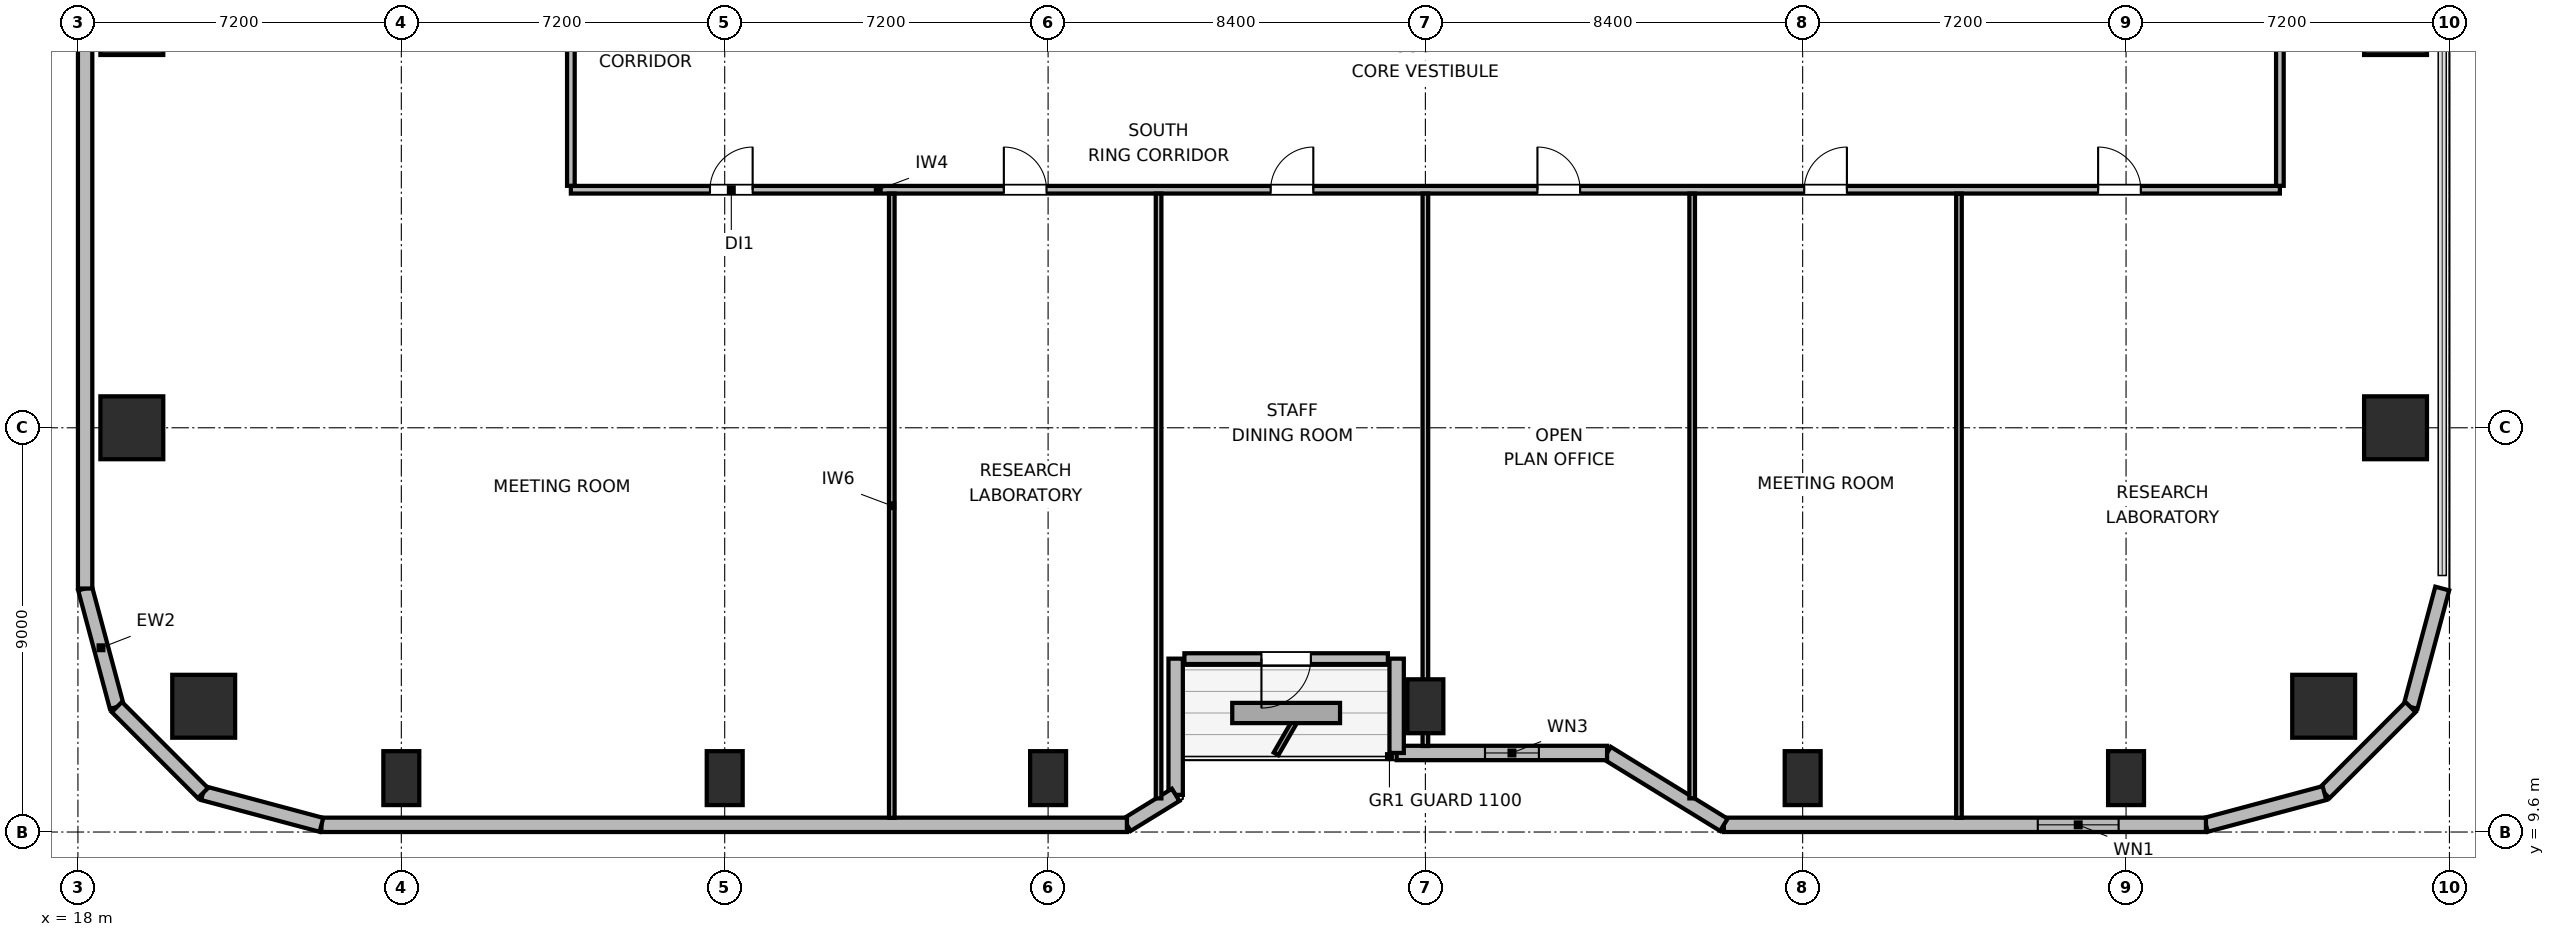
"""IFC4 building model, lengths in metres.
Left out: names, types, materials, properties, quantities, classifications, styles, units other than length and angle.
Written with IfcOpenShell. Run it as: python <this file> out.ifc"""

import sys

from ifc_helpers import new_model, si_unit, direction, frame, frame_2d, origin, origin_2d, place, context, subcontext, project, spatial, rectangle, circle, extrude, element, fill, save


model = new_model("IFC4")
c1 = context("Model", 3, precision=1e-05, world=origin(), true_north=direction((0.0, 1.0)))
c2 = subcontext(c1, "Body", "Model", "MODEL_VIEW")
j1 = project(units=[si_unit("LENGTHUNIT", "METRE"), si_unit("PLANEANGLEUNIT", "RADIAN")], contexts=[c1])
p1 = place(None, origin())
s1 = spatial("IfcSite", under=j1, at=p1, CompositionType="ELEMENT")
p2 = place(p1, origin())
s2 = spatial("IfcBuilding", under=s1, at=p2, CompositionType="ELEMENT")
p3 = place(p2, frame((0.0, 0.0, 105.3)))
s3 = spatial("IfcBuildingStorey", under=s2, at=p3, CompositionType="ELEMENT", Elevation=105.3)
for number, where, z_axis, x_axis in (
    (1, (20.8, 12.4, 0.0), (0.0, 0.0, 1.0), (1.0, 0.0, 0.0)),
    (2, (68.0, 12.4, 0.0), (0.0, 0.0, 1.0), (1.0, 0.0, 0.0)),
):
    element("IfcColumn", number, at=place(p3, frame(where, z_axis=z_axis, x_axis=x_axis)), inside=s3, PredefinedType="COLUMN", context=c2, shape_type="SweptSolid", body=[
        extrude(circle(Radius=0.7, at=origin_2d()), origin(), (0.0, 0.0, 1.0), 3.9),
    ])
for number, where, z_axis, x_axis in (
    (3, (25.2, 10.8, 0.0), (0.0, 0.0, 1.0), (1.0, 0.0, 0.0)),
    (4, (32.4, 10.8, 0.0), (0.0, 0.0, 1.0), (1.0, 0.0, 0.0)),
    (5, (39.6, 10.8, 0.0), (0.0, 0.0, 1.0), (1.0, 0.0, 0.0)),
    (6, (48.0, 12.4, 0.0), (0.0, 0.0, 1.0), (1.0, 0.0, 0.0)),
    (7, (56.4, 10.8, 0.0), (0.0, 0.0, 1.0), (1.0, 0.0, 0.0)),
    (8, (63.6, 10.8, 0.0), (0.0, 0.0, 1.0), (1.0, 0.0, 0.0)),
):
    element("IfcColumn", number, at=place(p3, frame(where, z_axis=z_axis, x_axis=x_axis)), inside=s3, PredefinedType="COLUMN", context=c2, shape_type="SweptSolid", body=[
        extrude(rectangle(XDim=0.8, YDim=1.2, at=origin_2d()), origin(), (0.0, 0.0, 1.0), 3.9),
    ])
for number, where, z_axis, x_axis in (
    (9, (19.2, 18.6, 0.0), (0.0, 0.0, 1.0), (1.0, 0.0, 0.0)),
    (10, (69.6, 18.6, 0.0), (0.0, 0.0, 1.0), (1.0, 0.0, 0.0)),
    (11, (19.2, 27.6, 0.0), (0.0, 0.0, 1.0), (1.0, 0.0, 0.0)),
    (12, (69.6, 27.6, 0.0), (0.0, 0.0, 1.0), (1.0, 0.0, 0.0)),
):
    element("IfcColumn", number, at=place(p3, frame(where, z_axis=z_axis, x_axis=x_axis)), inside=s3, PredefinedType="COLUMN", context=c2, shape_type="SweptSolid", body=[
        extrude(rectangle(XDim=1.4, YDim=1.4, at=origin_2d()), origin(), (0.0, 0.0, 1.0), 3.9),
    ])
p4 = place(p3, frame((18.866, 12.383, 0.0), z_axis=(0.0, 0.0, 1.0), x_axis=(-0.25869736047, 0.965958423373, 0.0)))
e13 = element("IfcWall", 13, at=p4, inside=s3, PredefinedType="SOLIDWALL", context=c2, shape_type="SweptSolid", body=[
    extrude(rectangle(XDim=2.731, YDim=0.32, at=frame_2d((1.366, 0.0))), origin(), (0.0, 0.0, 1.0), 3.64),
])
p5 = place(p3, frame((18.16, 15.021, 0.0), z_axis=(0.0, 0.0, 1.0), x_axis=(0.0, 1.0, 0.0)))
e14 = element("IfcWall", 14, at=p5, inside=s3, PredefinedType="SOLIDWALL", context=c2, shape_type="SweptSolid", body=[
    extrude(rectangle(XDim=14.219, YDim=0.32, at=frame_2d((7.109, 0.0))), origin(), (0.0, 0.0, 1.0), 3.64),
])
p6 = place(p3, frame((70.64, 15.021, 0.0), z_axis=(0.0, 0.0, 1.0), x_axis=(-0.258613949072, -0.965980758269, 0.0)))
e15 = element("IfcWall", 15, at=p6, inside=s3, PredefinedType="SOLIDWALL", context=c2, shape_type="SweptSolid", body=[
    extrude(rectangle(XDim=2.731, YDim=0.32, at=frame_2d((1.366, 0.0))), origin(), (0.0, 0.0, 1.0), 3.64),
])
p7 = place(p3, frame((69.934, 12.383, 0.0), z_axis=(0.0, 0.0, 1.0), x_axis=(-0.707151821269, -0.707061738235, 0.0)))
e16 = element("IfcWall", 16, at=p7, inside=s3, PredefinedType="SOLIDWALL", context=c2, shape_type="SweptSolid", body=[
    extrude(rectangle(XDim=2.71, YDim=0.32, at=frame_2d((1.355, 0.0))), origin(), (0.0, 0.0, 1.0), 3.64),
])
p8 = place(p3, frame((68.017, 10.467, 0.0), z_axis=(0.0, 0.0, 1.0), x_axis=(-0.965958423373, -0.25869736047, 0.0)))
e17 = element("IfcWall", 17, at=p8, inside=s3, PredefinedType="SOLIDWALL", context=c2, shape_type="SweptSolid", body=[
    extrude(rectangle(XDim=2.731, YDim=0.32, at=frame_2d((1.366, 0.0))), origin(), (0.0, 0.0, 1.0), 3.64),
])
p9 = place(p3, frame((65.379, 9.76, 0.0), z_axis=(0.0, 0.0, 1.0), x_axis=(-1.0, 0.0, 0.0)))
e18 = element("IfcWall", 18, at=p9, inside=s3, PredefinedType="SOLIDWALL", context=c2, shape_type="SweptSolid", body=[
    extrude(rectangle(XDim=10.734, YDim=0.32, at=frame_2d((5.367, 0.0))), origin(), (0.0, 0.0, 1.0), 3.64),
])
p10 = place(p9, frame((1.944, 0.0, 0.85)))
e19 = element("IfcOpeningElement", 19, at=p10, cuts=e18, PredefinedType="OPENING", context=c2, shape_type="SweptSolid", body=[
    extrude(rectangle(XDim=1.8, YDim=1.1, at=frame_2d((0.9, 0.55))), frame((0.0, 0.17, 0.0), z_axis=(0.0, -1.0, 0.0), x_axis=(1.0, 0.0, 0.0)), (0.0, 0.0, 1.0), 0.34),
])
p11 = place(p3, frame((54.645, 9.76, 0.0), z_axis=(0.0, 0.0, 1.0), x_axis=(-0.851630857047, 0.524142044989, 0.0)))
e20 = element("IfcWall", 20, at=p11, inside=s3, PredefinedType="SOLIDWALL", context=c2, shape_type="SweptSolid", body=[
    extrude(rectangle(XDim=3.053, YDim=0.32, at=frame_2d((1.526, 0.0))), origin(), (0.0, 0.0, 1.0), 2.875),
])
p12 = place(p3, frame((52.045, 11.36, 0.0), z_axis=(0.0, 0.0, 1.0), x_axis=(-1.0, 0.0, 0.0)))
e21 = element("IfcWall", 21, at=p12, inside=s3, PredefinedType="SOLIDWALL", context=c2, shape_type="SweptSolid", body=[
    extrude(rectangle(XDim=4.685, YDim=0.32, at=frame_2d((2.343, 0.0))), origin(), (0.0, 0.0, 1.0), 2.875),
])
p13 = place(p12, frame((1.518, 0.0, 0.85)))
e22 = element("IfcOpeningElement", 22, at=p13, cuts=e21, PredefinedType="OPENING", context=c2, shape_type="SweptSolid", body=[
    extrude(rectangle(XDim=1.2, YDim=1.1, at=frame_2d((0.6, 0.55))), frame((0.0, 0.17, 0.0), z_axis=(0.0, -1.0, 0.0), x_axis=(1.0, 0.0, 0.0)), (0.0, 0.0, 1.0), 0.34),
])
p14 = place(p3, frame((47.36, 11.36, 0.0), z_axis=(0.0, 0.0, 1.0), x_axis=(0.0, 1.0, 0.0)))
e23 = element("IfcWall", 23, at=p14, inside=s3, PredefinedType="SOLIDWALL", context=c2, shape_type="SweptSolid", body=[
    extrude(rectangle(XDim=2.1, YDim=0.32, at=frame_2d((1.05, 0.0))), origin(), (0.0, 0.0, 1.0), 2.875),
])
p15 = place(p3, frame((47.165, 13.46, 0.0), z_axis=(0.0, 0.0, 1.0), x_axis=(-1.0, 0.0, 0.0)))
e24 = element("IfcWall", 24, at=p15, inside=s3, PredefinedType="SOLIDWALL", context=c2, shape_type="SweptSolid", body=[
    extrude(rectangle(XDim=4.53, YDim=0.24, at=frame_2d((2.265, 0.0))), origin(), (0.0, 0.0, 1.0), 3.64),
])
p16 = place(p15, frame((1.715, 0.0, 0.0)))
e25 = element("IfcOpeningElement", 25, at=p16, cuts=e24, PredefinedType="OPENING", context=c2, shape_type="SweptSolid", body=[
    extrude(rectangle(XDim=1.1, YDim=2.04, at=frame_2d((0.55, 1.02))), frame((0.0, 0.13, 0.0), z_axis=(0.0, -1.0, 0.0), x_axis=(1.0, 0.0, 0.0)), (0.0, 0.0, 1.0), 0.26),
])
p17 = place(p3, frame((42.44, 13.46, 0.0), z_axis=(0.0, 0.0, 1.0), x_axis=(0.0, -1.0, 0.0)))
e26 = element("IfcWall", 26, at=p17, inside=s3, PredefinedType="SOLIDWALL", context=c2, shape_type="SweptSolid", body=[
    extrude(rectangle(XDim=3.032, YDim=0.32, at=frame_2d((1.516, 0.0))), origin(), (0.0, 0.0, 1.0), 2.875),
])
p18 = place(p3, frame((42.44, 10.427, 0.0), z_axis=(0.0, 0.0, 1.0), x_axis=(-0.851776724646, -0.523904964045, 0.0)))
e27 = element("IfcWall", 27, at=p18, inside=s3, PredefinedType="SOLIDWALL", context=c2, shape_type="SweptSolid", body=[
    extrude(rectangle(XDim=1.274, YDim=0.32, at=frame_2d((0.637, 0.0))), origin(), (0.0, 0.0, 1.0), 3.64),
])
p19 = place(p3, frame((41.355, 9.76, 0.0), z_axis=(0.0, 0.0, 1.0), x_axis=(-1.0, 0.0, 0.0)))
e28 = element("IfcWall", 28, at=p19, inside=s3, PredefinedType="SOLIDWALL", context=c2, shape_type="SweptSolid", body=[
    extrude(rectangle(XDim=17.934, YDim=0.32, at=frame_2d((8.967, 0.0))), origin(), (0.0, 0.0, 1.0), 3.64),
])
p20 = place(p3, frame((23.421, 9.76, 0.0), z_axis=(0.0, 0.0, 1.0), x_axis=(-0.965964405026, 0.25867502435, 0.0)))
e29 = element("IfcWall", 29, at=p20, inside=s3, PredefinedType="SOLIDWALL", context=c2, shape_type="SweptSolid", body=[
    extrude(rectangle(XDim=2.731, YDim=0.32, at=frame_2d((1.366, 0.0))), origin(), (0.0, 0.0, 1.0), 3.64),
])
p21 = place(p3, frame((20.783, 10.467, 0.0), z_axis=(0.0, 0.0, 1.0), x_axis=(-0.707106781187, 0.707106781187, 0.0)))
e30 = element("IfcWall", 30, at=p21, inside=s3, PredefinedType="SOLIDWALL", context=c2, shape_type="SweptSolid", body=[
    extrude(rectangle(XDim=2.71, YDim=0.32, at=frame_2d((1.355, 0.0))), origin(), (0.0, 0.0, 1.0), 3.64),
])
p22 = place(p3, frame((28.975, 23.9, 0.0), z_axis=(0.0, 0.0, 1.0), x_axis=(1.0, 0.0, 0.0)))
e31 = element("IfcWall", 31, at=p22, inside=s3, PredefinedType="PARTITIONING", context=c2, shape_type="SweptSolid", body=[
    extrude(rectangle(XDim=38.05, YDim=0.17, at=frame_2d((19.025, 0.0))), origin(), (0.0, 0.0, 1.0), 3.64),
])
p23 = place(p22, frame((3.097, 0.0, 0.0)))
e32 = element("IfcOpeningElement", 32, at=p23, cuts=e31, PredefinedType="OPENING", context=c2, shape_type="SweptSolid", body=[
    extrude(rectangle(XDim=0.95, YDim=2.04, at=frame_2d((0.475, 1.02))), frame((0.0, 0.095, 0.0), z_axis=(0.0, -1.0, 0.0), x_axis=(1.0, 0.0, 0.0)), (0.0, 0.0, 1.0), 0.19),
])
p24 = place(p22, frame((9.64, 0.0, 0.0)))
e33 = element("IfcOpeningElement", 33, at=p24, cuts=e31, PredefinedType="OPENING", context=c2, shape_type="SweptSolid", body=[
    extrude(rectangle(XDim=0.95, YDim=2.04, at=frame_2d((0.475, 1.02))), frame((0.0, 0.095, 0.0), z_axis=(0.0, -1.0, 0.0), x_axis=(1.0, 0.0, 0.0)), (0.0, 0.0, 1.0), 0.19),
])
p25 = place(p22, frame((15.58, 0.0, 0.0)))
e34 = element("IfcOpeningElement", 34, at=p25, cuts=e31, PredefinedType="OPENING", context=c2, shape_type="SweptSolid", body=[
    extrude(rectangle(XDim=0.95, YDim=2.04, at=frame_2d((0.475, 1.02))), frame((0.0, 0.095, 0.0), z_axis=(0.0, -1.0, 0.0), x_axis=(1.0, 0.0, 0.0)), (0.0, 0.0, 1.0), 0.19),
])
p26 = place(p22, frame((21.52, 0.0, 0.0)))
e35 = element("IfcOpeningElement", 35, at=p26, cuts=e31, PredefinedType="OPENING", context=c2, shape_type="SweptSolid", body=[
    extrude(rectangle(XDim=0.95, YDim=2.04, at=frame_2d((0.475, 1.02))), frame((0.0, 0.095, 0.0), z_axis=(0.0, -1.0, 0.0), x_axis=(1.0, 0.0, 0.0)), (0.0, 0.0, 1.0), 0.19),
])
p27 = place(p22, frame((27.46, 0.0, 0.0)))
e36 = element("IfcOpeningElement", 36, at=p27, cuts=e31, PredefinedType="OPENING", context=c2, shape_type="SweptSolid", body=[
    extrude(rectangle(XDim=0.95, YDim=2.04, at=frame_2d((0.475, 1.02))), frame((0.0, 0.095, 0.0), z_axis=(0.0, -1.0, 0.0), x_axis=(1.0, 0.0, 0.0)), (0.0, 0.0, 1.0), 0.19),
])
p28 = place(p22, frame((34.003, 0.0, 0.0)))
e37 = element("IfcOpeningElement", 37, at=p28, cuts=e31, PredefinedType="OPENING", context=c2, shape_type="SweptSolid", body=[
    extrude(rectangle(XDim=0.95, YDim=2.04, at=frame_2d((0.475, 1.02))), frame((0.0, 0.095, 0.0), z_axis=(0.0, -1.0, 0.0), x_axis=(1.0, 0.0, 0.0)), (0.0, 0.0, 1.0), 0.19),
])
p29 = place(p3, frame((28.975, 23.987, 0.0), z_axis=(0.0, 0.0, 1.0), x_axis=(0.0, 1.0, 0.0)))
e38 = element("IfcWall", 38, at=p29, inside=s3, PredefinedType="PARTITIONING", context=c2, shape_type="SweptSolid", body=[
    extrude(rectangle(XDim=24.026, YDim=0.17, at=frame_2d((12.013, 0.0))), origin(), (0.0, 0.0, 1.0), 3.64),
])
p30 = place(p29, frame((11.538, 0.0, 0.0)))
e39 = element("IfcOpeningElement", 39, at=p30, cuts=e38, PredefinedType="OPENING", context=c2, shape_type="SweptSolid", body=[
    extrude(rectangle(XDim=0.95, YDim=2.04, at=frame_2d((0.475, 1.02))), frame((0.0, 0.095, 0.0), z_axis=(0.0, -1.0, 0.0), x_axis=(1.0, 0.0, 0.0)), (0.0, 0.0, 1.0), 0.19),
])
p31 = place(p3, frame((67.025, 23.987, 0.0), z_axis=(0.0, 0.0, 1.0), x_axis=(0.0, 1.0, 0.0)))
e40 = element("IfcWall", 40, at=p31, inside=s3, PredefinedType="PARTITIONING", context=c2, shape_type="SweptSolid", body=[
    extrude(rectangle(XDim=24.026, YDim=0.17, at=frame_2d((12.013, 0.0))), origin(), (0.0, 0.0, 1.0), 3.64),
])
p32 = place(p31, frame((6.088, 0.0, 0.0)))
e41 = element("IfcOpeningElement", 41, at=p32, cuts=e40, PredefinedType="OPENING", context=c2, shape_type="SweptSolid", body=[
    extrude(rectangle(XDim=0.95, YDim=2.04, at=frame_2d((0.475, 1.02))), frame((0.0, 0.095, 0.0), z_axis=(0.0, -1.0, 0.0), x_axis=(1.0, 0.0, 0.0)), (0.0, 0.0, 1.0), 0.19),
])
p33 = place(p31, frame((18.188, 0.0, 0.0)))
e42 = element("IfcOpeningElement", 42, at=p33, cuts=e40, PredefinedType="OPENING", context=c2, shape_type="SweptSolid", body=[
    extrude(rectangle(XDim=0.95, YDim=2.04, at=frame_2d((0.475, 1.02))), frame((0.0, 0.095, 0.0), z_axis=(0.0, -1.0, 0.0), x_axis=(1.0, 0.0, 0.0)), (0.0, 0.0, 1.0), 0.19),
])
p34 = place(p3, frame((36.12, 9.915, 0.0), z_axis=(0.0, 0.0, 1.0), x_axis=(0.0, 1.0, 0.0)))
e43 = element("IfcWall", 43, at=p34, inside=s3, PredefinedType="PARTITIONING", context=c2, shape_type="SweptSolid", body=[
    extrude(rectangle(XDim=13.898, YDim=0.125, at=frame_2d((6.949, 0.0))), origin(), (0.0, 0.0, 1.0), 3.64),
])
p35 = place(p3, frame((42.06, 10.349, 0.0), z_axis=(0.0, 0.0, 1.0), x_axis=(0.0, 1.0, 0.0)))
e44 = element("IfcWall", 44, at=p35, inside=s3, PredefinedType="PARTITIONING", context=c2, shape_type="SweptSolid", body=[
    extrude(rectangle(XDim=13.464, YDim=0.125, at=frame_2d((6.732, 0.0))), origin(), (0.0, 0.0, 1.0), 3.003),
])
p36 = place(p3, frame((48.0, 11.515, 0.0), z_axis=(0.0, 0.0, 1.0), x_axis=(0.0, 1.0, 0.0)))
e45 = element("IfcWall", 45, at=p36, inside=s3, PredefinedType="PARTITIONING", context=c2, shape_type="SweptSolid", body=[
    extrude(rectangle(XDim=12.298, YDim=0.125, at=frame_2d((6.149, 0.0))), origin(), (0.0, 0.0, 1.0), 3.003),
])
p37 = place(p3, frame((53.94, 10.349, 0.0), z_axis=(0.0, 0.0, 1.0), x_axis=(0.0, 1.0, 0.0)))
e46 = element("IfcWall", 46, at=p37, inside=s3, PredefinedType="PARTITIONING", context=c2, shape_type="SweptSolid", body=[
    extrude(rectangle(XDim=13.464, YDim=0.125, at=frame_2d((6.732, 0.0))), origin(), (0.0, 0.0, 1.0), 3.003),
])
p38 = place(p3, frame((59.88, 9.915, 0.0), z_axis=(0.0, 0.0, 1.0), x_axis=(0.0, 1.0, 0.0)))
e47 = element("IfcWall", 47, at=p38, inside=s3, PredefinedType="PARTITIONING", context=c2, shape_type="SweptSolid", body=[
    extrude(rectangle(XDim=13.898, YDim=0.125, at=frame_2d((6.949, 0.0))), origin(), (0.0, 0.0, 1.0), 3.64),
])
p39 = place(p10, origin())
e48 = element("IfcWindow", 48, at=p39, inside=s3, PartitioningType="SINGLE_PANEL", PredefinedType="WINDOW", context=c2, shape_type="SweptSolid", body=[
    extrude(rectangle(XDim=1.8, YDim=1.1, at=frame_2d((0.9, 0.55))), frame((0.0, 0.03, 0.0), z_axis=(0.0, -1.0, 0.0), x_axis=(1.0, 0.0, 0.0)), (0.0, 0.0, 1.0), 0.06),
])
fill(e19, e48)
p40 = place(p13, origin())
e49 = element("IfcWindow", 49, at=p40, inside=s3, PartitioningType="SINGLE_PANEL", PredefinedType="WINDOW", context=c2, shape_type="SweptSolid", body=[
    extrude(rectangle(XDim=1.2, YDim=1.1, at=frame_2d((0.6, 0.55))), frame((0.0, 0.03, 0.0), z_axis=(0.0, -1.0, 0.0), x_axis=(1.0, 0.0, 0.0)), (0.0, 0.0, 1.0), 0.06),
])
fill(e22, e49)
p41 = place(p16, origin())
e50 = element("IfcDoor", 50, at=p41, inside=s3, OperationType="SINGLE_SWING_RIGHT", PredefinedType="DOOR", context=c2, shape_type="SweptSolid", body=[
    extrude(rectangle(XDim=1.1, YDim=2.04, at=frame_2d((0.55, 1.02))), frame((0.0, 0.025, 0.0), z_axis=(0.0, -1.0, 0.0), x_axis=(1.0, 0.0, 0.0)), (0.0, 0.0, 1.0), 0.05),
])
fill(e25, e50)
p42 = place(p23, origin())
e51 = element("IfcDoor", 51, at=p42, inside=s3, OperationType="SINGLE_SWING_RIGHT", PredefinedType="DOOR", context=c2, shape_type="SweptSolid", body=[
    extrude(rectangle(XDim=0.95, YDim=2.04, at=frame_2d((0.475, 1.02))), frame((0.0, 0.025, 0.0), z_axis=(0.0, -1.0, 0.0), x_axis=(1.0, 0.0, 0.0)), (0.0, 0.0, 1.0), 0.05),
])
fill(e32, e51)
p43 = place(p24, origin())
e52 = element("IfcDoor", 52, at=p43, inside=s3, OperationType="SINGLE_SWING_LEFT", PredefinedType="DOOR", context=c2, shape_type="SweptSolid", body=[
    extrude(rectangle(XDim=0.95, YDim=2.04, at=frame_2d((0.475, 1.02))), frame((0.0, 0.025, 0.0), z_axis=(0.0, -1.0, 0.0), x_axis=(1.0, 0.0, 0.0)), (0.0, 0.0, 1.0), 0.05),
])
fill(e33, e52)
p44 = place(p25, origin())
e53 = element("IfcDoor", 53, at=p44, inside=s3, OperationType="SINGLE_SWING_RIGHT", PredefinedType="DOOR", context=c2, shape_type="SweptSolid", body=[
    extrude(rectangle(XDim=0.95, YDim=2.04, at=frame_2d((0.475, 1.02))), frame((0.0, 0.025, 0.0), z_axis=(0.0, -1.0, 0.0), x_axis=(1.0, 0.0, 0.0)), (0.0, 0.0, 1.0), 0.05),
])
fill(e34, e53)
p45 = place(p26, origin())
e54 = element("IfcDoor", 54, at=p45, inside=s3, OperationType="SINGLE_SWING_LEFT", PredefinedType="DOOR", context=c2, shape_type="SweptSolid", body=[
    extrude(rectangle(XDim=0.95, YDim=2.04, at=frame_2d((0.475, 1.02))), frame((0.0, 0.025, 0.0), z_axis=(0.0, -1.0, 0.0), x_axis=(1.0, 0.0, 0.0)), (0.0, 0.0, 1.0), 0.05),
])
fill(e35, e54)
p46 = place(p27, origin())
e55 = element("IfcDoor", 55, at=p46, inside=s3, OperationType="SINGLE_SWING_RIGHT", PredefinedType="DOOR", context=c2, shape_type="SweptSolid", body=[
    extrude(rectangle(XDim=0.95, YDim=2.04, at=frame_2d((0.475, 1.02))), frame((0.0, 0.025, 0.0), z_axis=(0.0, -1.0, 0.0), x_axis=(1.0, 0.0, 0.0)), (0.0, 0.0, 1.0), 0.05),
])
fill(e36, e55)
p47 = place(p28, origin())
e56 = element("IfcDoor", 56, at=p47, inside=s3, OperationType="SINGLE_SWING_LEFT", PredefinedType="DOOR", context=c2, shape_type="SweptSolid", body=[
    extrude(rectangle(XDim=0.95, YDim=2.04, at=frame_2d((0.475, 1.02))), frame((0.0, 0.025, 0.0), z_axis=(0.0, -1.0, 0.0), x_axis=(1.0, 0.0, 0.0)), (0.0, 0.0, 1.0), 0.05),
])
fill(e37, e56)
save(model, sys.argv[1])
